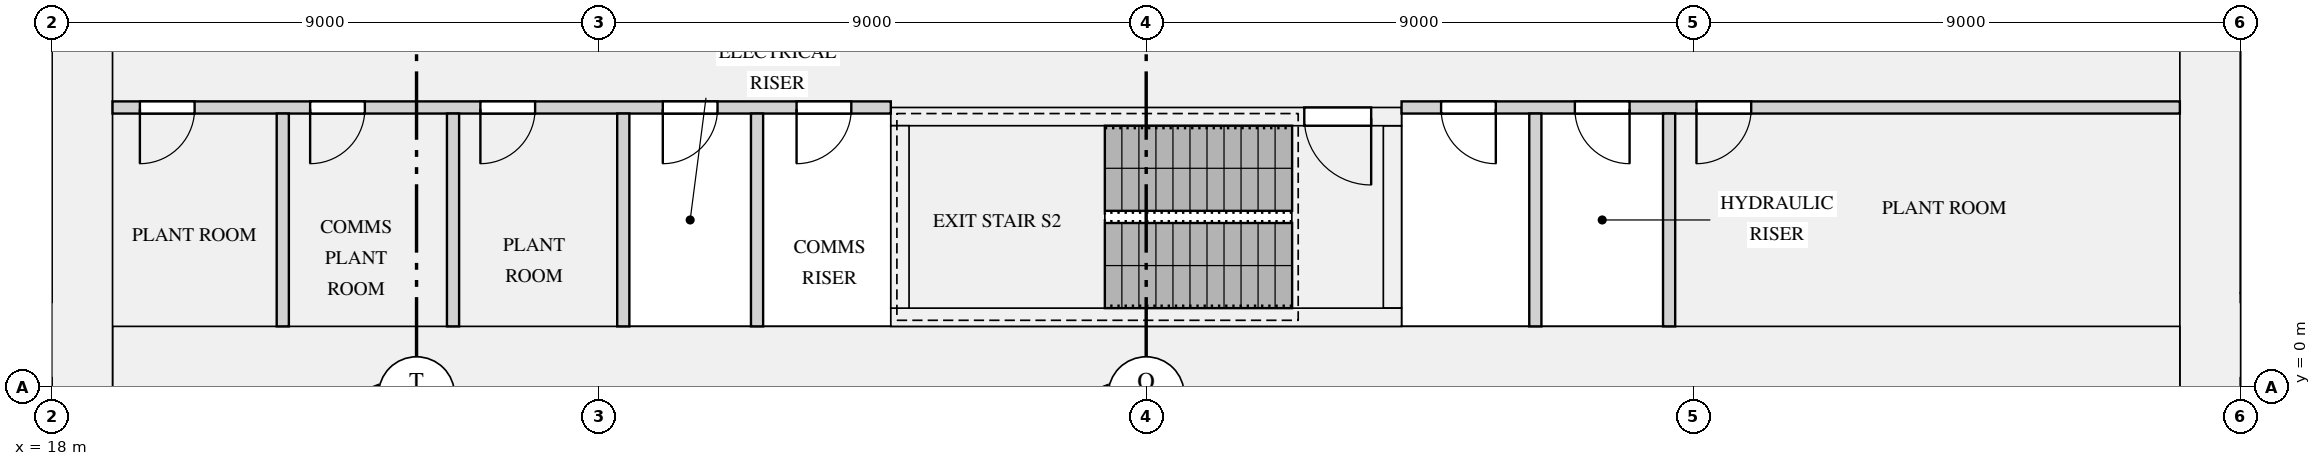
"""IFC4 building model, lengths in metres.
Left out: names, types, materials, properties, quantities, classifications, styles, units other than length and angle.
Written with IfcOpenShell. Run it as: python <this file> out.ifc"""

import sys

from ifc_helpers import new_model, si_unit, direction, frame, frame_2d, origin, place, context, subcontext, project, spatial, rectangle, extrude, element, fill, save


model = new_model("IFC4")
c1 = context("Model", 3, precision=1e-05, world=origin(), true_north=direction((0.0, 1.0)))
c2 = subcontext(c1, "Body", "Model", "MODEL_VIEW")
j1 = project(units=[si_unit("LENGTHUNIT", "METRE"), si_unit("PLANEANGLEUNIT", "RADIAN")], contexts=[c1])
p1 = place(None, origin())
s1 = spatial("IfcSite", under=j1, at=p1, CompositionType="ELEMENT")
p2 = place(p1, origin())
s2 = spatial("IfcBuilding", under=s1, at=p2, CompositionType="ELEMENT")
p3 = place(p2, frame((0.0, 0.0, 15.5)))
s3 = spatial("IfcBuildingStorey", under=s2, at=p3, CompositionType="ELEMENT", Elevation=15.5)
for number, where, z_axis, x_axis in (
    (1, (18.5, 0.0, 0.0), (0.0, 0.0, 1.0), (0.0, 1.0, 0.0)),
    (2, (53.5, 0.0, 0.0), (0.0, 0.0, 1.0), (0.0, 1.0, 0.0)),
):
    element("IfcWall", number, at=place(p3, frame(where, z_axis=z_axis, x_axis=x_axis)), inside=s3, PredefinedType="SHEAR", context=c2, shape_type="SweptSolid", body=[
        extrude(rectangle(XDim=12.5, YDim=1.0, at=frame_2d((6.25, 0.0))), origin(), (0.0, 0.0, 1.0), 4.0),
    ])
p4 = place(p3, frame((19.0, 0.5, 0.0), z_axis=(0.0, 0.0, 1.0), x_axis=(1.0, 0.0, 0.0)))
e3 = element("IfcWall", 3, at=p4, inside=s3, PredefinedType="SHEAR", context=c2, shape_type="SweptSolid", body=[
    extrude(rectangle(XDim=34.0, YDim=1.0, at=frame_2d((17.0, 0.0))), origin(), (0.0, 0.0, 1.0), 4.0),
])
p5 = place(p3, frame((31.8, 1.15, 0.0), z_axis=(0.0, 0.0, 1.0), x_axis=(1.0, 0.0, 0.0)))
e4 = element("IfcWall", 4, at=p5, inside=s3, PredefinedType="SHEAR", context=c2, shape_type="SweptSolid", body=[
    extrude(rectangle(XDim=8.4, YDim=0.3, at=frame_2d((4.2, 0.0))), origin(), (0.0, 0.0, 1.0), 4.0),
])
p6 = place(p3, frame((31.8, 4.45, 0.0), z_axis=(0.0, 0.0, 1.0), x_axis=(1.0, 0.0, 0.0)))
e5 = element("IfcWall", 5, at=p6, inside=s3, PredefinedType="SHEAR", context=c2, shape_type="SweptSolid", body=[
    extrude(rectangle(XDim=8.4, YDim=0.3, at=frame_2d((4.2, 0.0))), origin(), (0.0, 0.0, 1.0), 4.0),
])
p7 = place(p6, frame((6.8, 0.0, 0.0)))
e6 = element("IfcOpeningElement", 6, at=p7, cuts=e5, PredefinedType="OPENING", context=c2, shape_type="SweptSolid", body=[
    extrude(rectangle(XDim=1.1, YDim=2.1, at=frame_2d((0.55, 1.05))), frame((0.0, 0.16, 0.0), z_axis=(0.0, -1.0, 0.0), x_axis=(1.0, 0.0, 0.0)), (0.0, 0.0, 1.0), 0.32),
])
for number, where, z_axis, x_axis in (
    (7, (31.95, 1.3, 0.0), (0.0, 0.0, 1.0), (0.0, 1.0, 0.0)),
    (8, (40.05, 1.3, 0.0), (0.0, 0.0, 1.0), (0.0, 1.0, 0.0)),
):
    element("IfcWall", number, at=place(p3, frame(where, z_axis=z_axis, x_axis=x_axis)), inside=s3, PredefinedType="SHEAR", context=c2, shape_type="SweptSolid", body=[
        extrude(rectangle(XDim=3.0, YDim=0.3, at=frame_2d((1.5, 0.0))), origin(), (0.0, 0.0, 1.0), 4.0),
    ])
p8 = place(p3, frame((19.0, 4.6, 0.0), z_axis=(0.0, 0.0, 1.0), x_axis=(1.0, 0.0, 0.0)))
e9 = element("IfcWall", 9, at=p8, inside=s3, PredefinedType="PARTITIONING", context=c2, shape_type="SweptSolid", body=[
    extrude(rectangle(XDim=12.8, YDim=0.2, at=frame_2d((6.4, 0.0))), origin(), (0.0, 0.0, 1.0), 3.68),
])
p9 = place(p8, frame((0.45, 0.0, 0.0)))
e10 = element("IfcOpeningElement", 10, at=p9, cuts=e9, PredefinedType="OPENING", context=c2, shape_type="SweptSolid", body=[
    extrude(rectangle(XDim=0.9, YDim=2.1, at=frame_2d((0.45, 1.05))), frame((0.0, 0.11, 0.0), z_axis=(0.0, -1.0, 0.0), x_axis=(1.0, 0.0, 0.0)), (0.0, 0.0, 1.0), 0.22),
])
p10 = place(p8, frame((3.25, 0.0, 0.0)))
e11 = element("IfcOpeningElement", 11, at=p10, cuts=e9, PredefinedType="OPENING", context=c2, shape_type="SweptSolid", body=[
    extrude(rectangle(XDim=0.9, YDim=2.1, at=frame_2d((0.45, 1.05))), frame((0.0, 0.11, 0.0), z_axis=(0.0, -1.0, 0.0), x_axis=(1.0, 0.0, 0.0)), (0.0, 0.0, 1.0), 0.22),
])
p11 = place(p8, frame((6.05, 0.0, 0.0)))
e12 = element("IfcOpeningElement", 12, at=p11, cuts=e9, PredefinedType="OPENING", context=c2, shape_type="SweptSolid", body=[
    extrude(rectangle(XDim=0.9, YDim=2.1, at=frame_2d((0.45, 1.05))), frame((0.0, 0.11, 0.0), z_axis=(0.0, -1.0, 0.0), x_axis=(1.0, 0.0, 0.0)), (0.0, 0.0, 1.0), 0.22),
])
p12 = place(p8, frame((9.05, 0.0, 0.0)))
e13 = element("IfcOpeningElement", 13, at=p12, cuts=e9, PredefinedType="OPENING", context=c2, shape_type="SweptSolid", body=[
    extrude(rectangle(XDim=0.9, YDim=2.1, at=frame_2d((0.45, 1.05))), frame((0.0, 0.11, 0.0), z_axis=(0.0, -1.0, 0.0), x_axis=(1.0, 0.0, 0.0)), (0.0, 0.0, 1.0), 0.22),
])
p13 = place(p8, frame((11.25, 0.0, 0.0)))
e14 = element("IfcOpeningElement", 14, at=p13, cuts=e9, PredefinedType="OPENING", context=c2, shape_type="SweptSolid", body=[
    extrude(rectangle(XDim=0.9, YDim=2.1, at=frame_2d((0.45, 1.05))), frame((0.0, 0.11, 0.0), z_axis=(0.0, -1.0, 0.0), x_axis=(1.0, 0.0, 0.0)), (0.0, 0.0, 1.0), 0.22),
])
p14 = place(p3, frame((40.2, 4.6, 0.0), z_axis=(0.0, 0.0, 1.0), x_axis=(1.0, 0.0, 0.0)))
e15 = element("IfcWall", 15, at=p14, inside=s3, PredefinedType="PARTITIONING", context=c2, shape_type="SweptSolid", body=[
    extrude(rectangle(XDim=12.8, YDim=0.2, at=frame_2d((6.4, 0.0))), origin(), (0.0, 0.0, 1.0), 3.68),
])
p15 = place(p14, frame((4.85, 0.0, 0.0)))
e16 = element("IfcOpeningElement", 16, at=p15, cuts=e15, PredefinedType="OPENING", context=c2, shape_type="SweptSolid", body=[
    extrude(rectangle(XDim=0.9, YDim=2.1, at=frame_2d((0.45, 1.05))), frame((0.0, 0.11, 0.0), z_axis=(0.0, -1.0, 0.0), x_axis=(1.0, 0.0, 0.0)), (0.0, 0.0, 1.0), 0.22),
])
p16 = place(p14, frame((0.65, 0.0, 0.0)))
e17 = element("IfcOpeningElement", 17, at=p16, cuts=e15, PredefinedType="OPENING", context=c2, shape_type="SweptSolid", body=[
    extrude(rectangle(XDim=0.9, YDim=2.1, at=frame_2d((0.45, 1.05))), frame((0.0, 0.11, 0.0), z_axis=(0.0, -1.0, 0.0), x_axis=(1.0, 0.0, 0.0)), (0.0, 0.0, 1.0), 0.22),
])
p17 = place(p14, frame((2.85, 0.0, 0.0)))
e18 = element("IfcOpeningElement", 18, at=p17, cuts=e15, PredefinedType="OPENING", context=c2, shape_type="SweptSolid", body=[
    extrude(rectangle(XDim=0.9, YDim=2.1, at=frame_2d((0.45, 1.05))), frame((0.0, 0.11, 0.0), z_axis=(0.0, -1.0, 0.0), x_axis=(1.0, 0.0, 0.0)), (0.0, 0.0, 1.0), 0.22),
])
for number, where, z_axis, x_axis in (
    (19, (21.8, 1.0, 0.0), (0.0, 0.0, 1.0), (0.0, 1.0, 0.0)),
    (20, (24.6, 1.0, 0.0), (0.0, 0.0, 1.0), (0.0, 1.0, 0.0)),
    (21, (27.4, 1.0, 0.0), (0.0, 0.0, 1.0), (0.0, 1.0, 0.0)),
    (22, (29.6, 1.0, 0.0), (0.0, 0.0, 1.0), (0.0, 1.0, 0.0)),
    (23, (42.4, 1.0, 0.0), (0.0, 0.0, 1.0), (0.0, 1.0, 0.0)),
    (24, (44.6, 1.0, 0.0), (0.0, 0.0, 1.0), (0.0, 1.0, 0.0)),
):
    element("IfcWall", number, at=place(p3, frame(where, z_axis=z_axis, x_axis=x_axis)), inside=s3, PredefinedType="PARTITIONING", context=c2, shape_type="SweptSolid", body=[
        extrude(rectangle(XDim=3.5, YDim=0.2, at=frame_2d((1.75, 0.0))), origin(), (0.0, 0.0, 1.0), 3.68),
    ])
p18 = place(p3, frame((54.0, 1.475, 0.0), z_axis=(0.0, 0.0, 1.0), x_axis=(1.0, 0.0, 0.0)))
e25 = element("IfcWall", 25, at=p18, inside=s3, PredefinedType="PARTITIONING", context=c2, shape_type="SweptSolid", body=[
    extrude(rectangle(XDim=8.3, YDim=0.15, at=frame_2d((4.15, 0.0))), origin(), (0.0, 0.0, 1.0), 3.68),
])
p19 = place(p7, frame((1.1, 0.0, 0.0), z_axis=(0.0, 0.0, 1.0), x_axis=(-1.0, 0.0, 0.0)))
e26 = element("IfcDoor", 26, at=p19, inside=s3, OperationType="SINGLE_SWING_LEFT", PredefinedType="DOOR", context=c2, shape_type="SweptSolid", body=[
    extrude(rectangle(XDim=1.1, YDim=2.1, at=frame_2d((0.55, 1.05))), frame((0.0, 0.025, 0.0), z_axis=(0.0, -1.0, 0.0), x_axis=(1.0, 0.0, 0.0)), (0.0, 0.0, 1.0), 0.05),
])
fill(e6, e26)
p20 = place(p9, frame((0.9, 0.0, 0.0), z_axis=(0.0, 0.0, 1.0), x_axis=(-1.0, 0.0, 0.0)))
e27 = element("IfcDoor", 27, at=p20, inside=s3, OperationType="SINGLE_SWING_RIGHT", PredefinedType="DOOR", context=c2, shape_type="SweptSolid", body=[
    extrude(rectangle(XDim=0.9, YDim=2.1, at=frame_2d((0.45, 1.05))), frame((0.0, 0.025, 0.0), z_axis=(0.0, -1.0, 0.0), x_axis=(1.0, 0.0, 0.0)), (0.0, 0.0, 1.0), 0.05),
])
fill(e10, e27)
p21 = place(p10, frame((0.9, 0.0, 0.0), z_axis=(0.0, 0.0, 1.0), x_axis=(-1.0, 0.0, 0.0)))
e28 = element("IfcDoor", 28, at=p21, inside=s3, OperationType="SINGLE_SWING_RIGHT", PredefinedType="DOOR", context=c2, shape_type="SweptSolid", body=[
    extrude(rectangle(XDim=0.9, YDim=2.1, at=frame_2d((0.45, 1.05))), frame((0.0, 0.025, 0.0), z_axis=(0.0, -1.0, 0.0), x_axis=(1.0, 0.0, 0.0)), (0.0, 0.0, 1.0), 0.05),
])
fill(e11, e28)
p22 = place(p11, frame((0.9, 0.0, 0.0), z_axis=(0.0, 0.0, 1.0), x_axis=(-1.0, 0.0, 0.0)))
e29 = element("IfcDoor", 29, at=p22, inside=s3, OperationType="SINGLE_SWING_RIGHT", PredefinedType="DOOR", context=c2, shape_type="SweptSolid", body=[
    extrude(rectangle(XDim=0.9, YDim=2.1, at=frame_2d((0.45, 1.05))), frame((0.0, 0.025, 0.0), z_axis=(0.0, -1.0, 0.0), x_axis=(1.0, 0.0, 0.0)), (0.0, 0.0, 1.0), 0.05),
])
fill(e12, e29)
p23 = place(p15, frame((0.9, 0.0, 0.0), z_axis=(0.0, 0.0, 1.0), x_axis=(-1.0, 0.0, 0.0)))
e30 = element("IfcDoor", 30, at=p23, inside=s3, OperationType="SINGLE_SWING_RIGHT", PredefinedType="DOOR", context=c2, shape_type="SweptSolid", body=[
    extrude(rectangle(XDim=0.9, YDim=2.1, at=frame_2d((0.45, 1.05))), frame((0.0, 0.025, 0.0), z_axis=(0.0, -1.0, 0.0), x_axis=(1.0, 0.0, 0.0)), (0.0, 0.0, 1.0), 0.05),
])
fill(e16, e30)
p24 = place(p12, frame((0.9, 0.0, 0.0), z_axis=(0.0, 0.0, 1.0), x_axis=(-1.0, 0.0, 0.0)))
e31 = element("IfcDoor", 31, at=p24, inside=s3, OperationType="SINGLE_SWING_RIGHT", PredefinedType="DOOR", context=c2, shape_type="SweptSolid", body=[
    extrude(rectangle(XDim=0.9, YDim=2.1, at=frame_2d((0.45, 1.05))), frame((0.0, 0.025, 0.0), z_axis=(0.0, -1.0, 0.0), x_axis=(1.0, 0.0, 0.0)), (0.0, 0.0, 1.0), 0.05),
])
fill(e13, e31)
p25 = place(p13, frame((0.9, 0.0, 0.0), z_axis=(0.0, 0.0, 1.0), x_axis=(-1.0, 0.0, 0.0)))
e32 = element("IfcDoor", 32, at=p25, inside=s3, OperationType="SINGLE_SWING_RIGHT", PredefinedType="DOOR", context=c2, shape_type="SweptSolid", body=[
    extrude(rectangle(XDim=0.9, YDim=2.1, at=frame_2d((0.45, 1.05))), frame((0.0, 0.025, 0.0), z_axis=(0.0, -1.0, 0.0), x_axis=(1.0, 0.0, 0.0)), (0.0, 0.0, 1.0), 0.05),
])
fill(e14, e32)
p26 = place(p16, frame((0.9, 0.0, 0.0), z_axis=(0.0, 0.0, 1.0), x_axis=(-1.0, 0.0, 0.0)))
e33 = element("IfcDoor", 33, at=p26, inside=s3, OperationType="SINGLE_SWING_LEFT", PredefinedType="DOOR", context=c2, shape_type="SweptSolid", body=[
    extrude(rectangle(XDim=0.9, YDim=2.1, at=frame_2d((0.45, 1.05))), frame((0.0, 0.025, 0.0), z_axis=(0.0, -1.0, 0.0), x_axis=(1.0, 0.0, 0.0)), (0.0, 0.0, 1.0), 0.05),
])
fill(e17, e33)
p27 = place(p17, frame((0.9, 0.0, 0.0), z_axis=(0.0, 0.0, 1.0), x_axis=(-1.0, 0.0, 0.0)))
e34 = element("IfcDoor", 34, at=p27, inside=s3, OperationType="SINGLE_SWING_LEFT", PredefinedType="DOOR", context=c2, shape_type="SweptSolid", body=[
    extrude(rectangle(XDim=0.9, YDim=2.1, at=frame_2d((0.45, 1.05))), frame((0.0, 0.025, 0.0), z_axis=(0.0, -1.0, 0.0), x_axis=(1.0, 0.0, 0.0)), (0.0, 0.0, 1.0), 0.05),
])
fill(e18, e34)
save(model, sys.argv[1])
